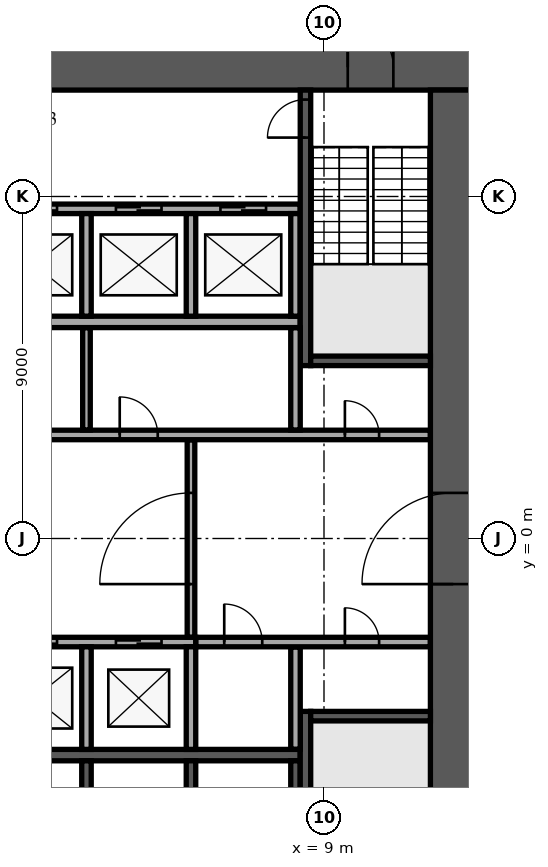
"""IFC4 building model, lengths in metres.
Left out: names, types, materials, properties, quantities, classifications, styles, units other than length and angle.
Written with IfcOpenShell. Run it as: python <this file> out.ifc"""

import sys

from ifc_helpers import new_model, si_unit, direction, frame, frame_2d, origin, place, context, subcontext, project, spatial, rectangle, extrude, element, fill, save


model = new_model("IFC4")
c1 = context("Model", 3, precision=1e-05, world=origin(), true_north=direction((0.0, 1.0)))
c2 = subcontext(c1, "Body", "Model", "MODEL_VIEW")
j1 = project(units=[si_unit("LENGTHUNIT", "METRE"), si_unit("PLANEANGLEUNIT", "RADIAN")], contexts=[c1])
p1 = place(None, origin())
s1 = spatial("IfcSite", under=j1, at=p1, CompositionType="ELEMENT")
p2 = place(p1, origin())
s2 = spatial("IfcBuilding", under=s1, at=p2, CompositionType="ELEMENT")
p3 = place(p2, origin())
s3 = spatial("IfcBuildingStorey", under=s2, at=p3, CompositionType="ELEMENT", Elevation=0.0)
p4 = place(p3, frame((-13.0, 12.4, 0.0), z_axis=(0.0, 0.0, 1.0), x_axis=(1.0, 0.0, 0.0)))
e1 = element("IfcWall", 1, at=p4, inside=s3, PredefinedType="SHEAR", context=c2, shape_type="SweptSolid", body=[
    extrude(rectangle(XDim=26.0, YDim=1.2, at=frame_2d((13.0, 0.0))), origin(), (0.0, 0.0, 1.0), 4.1),
])
p5 = place(p4, frame((11.8, 0.0, 0.0)))
e2 = element("IfcOpeningElement", 2, at=p5, cuts=e1, PredefinedType="OPENING", context=c2, shape_type="SweptSolid", body=[
    extrude(rectangle(XDim=2.4, YDim=2.4, at=frame_2d((1.2, 1.2))), frame((0.0, 0.61, 0.0), z_axis=(0.0, -1.0, 0.0), x_axis=(1.0, 0.0, 0.0)), (0.0, 0.0, 1.0), 1.22),
])
p6 = place(p4, frame((22.625, 0.0, 0.0)))
e3 = element("IfcOpeningElement", 3, at=p6, cuts=e1, PredefinedType="OPENING", context=c2, shape_type="SweptSolid", body=[
    extrude(rectangle(XDim=1.2, YDim=2.1, at=frame_2d((0.6, 1.05))), frame((0.0, 0.61, 0.0), z_axis=(0.0, -1.0, 0.0), x_axis=(1.0, 0.0, 0.0)), (0.0, 0.0, 1.0), 1.22),
])
p7 = place(p4, frame((1.6, 0.0, 0.0)))
e4 = element("IfcOpeningElement", 4, at=p7, cuts=e1, PredefinedType="OPENING", context=c2, shape_type="SweptSolid", body=[
    extrude(rectangle(XDim=1.0, YDim=2.1, at=frame_2d((0.5, 1.05))), frame((0.0, 0.61, 0.0), z_axis=(0.0, -1.0, 0.0), x_axis=(1.0, 0.0, 0.0)), (0.0, 0.0, 1.0), 1.22),
])
p8 = place(p3, frame((12.4, -11.8, 0.0), z_axis=(0.0, 0.0, 1.0), x_axis=(0.0, 1.0, 0.0)))
e5 = element("IfcWall", 5, at=p8, inside=s3, PredefinedType="SHEAR", context=c2, shape_type="SweptSolid", body=[
    extrude(rectangle(XDim=23.6, YDim=1.2, at=frame_2d((11.8, 0.0))), origin(), (0.0, 0.0, 1.0), 4.1),
])
p9 = place(p8, frame((10.6, 0.0, 0.0)))
e6 = element("IfcOpeningElement", 6, at=p9, cuts=e5, PredefinedType="OPENING", context=c2, shape_type="SweptSolid", body=[
    extrude(rectangle(XDim=2.4, YDim=2.4, at=frame_2d((1.2, 1.2))), frame((0.0, 0.61, 0.0), z_axis=(0.0, -1.0, 0.0), x_axis=(1.0, 0.0, 0.0)), (0.0, 0.0, 1.0), 1.22),
])
for number, where, z_axis, x_axis in (
    (7, (-8.375, 5.7, 0.0), (0.0, 0.0, 1.0), (1.0, 0.0, 0.0)),
    (8, (-8.375, -5.7, 0.0), (0.0, 0.0, 1.0), (1.0, 0.0, 0.0)),
):
    element("IfcWall", number, at=place(p3, frame(where, z_axis=z_axis, x_axis=x_axis)), inside=s3, PredefinedType="SOLIDWALL", context=c2, shape_type="SweptSolid", body=[
        extrude(rectangle(XDim=16.75, YDim=0.3, at=frame_2d((8.375, 0.0))), origin(), (0.0, 0.0, 1.0), 4.1),
    ])
p10 = place(p3, frame((-8.375, 8.675, 0.0), z_axis=(0.0, 0.0, 1.0), x_axis=(1.0, 0.0, 0.0)))
e9 = element("IfcWall", 9, at=p10, inside=s3, PredefinedType="SOLIDWALL", context=c2, shape_type="SweptSolid", body=[
    extrude(rectangle(XDim=16.75, YDim=0.25, at=frame_2d((8.375, 0.0))), origin(), (0.0, 0.0, 1.0), 4.1),
])
p11 = place(p10, frame((0.9, 0.0, 0.0)))
e10 = element("IfcOpeningElement", 10, at=p11, cuts=e9, PredefinedType="OPENING", context=c2, shape_type="SweptSolid", body=[
    extrude(rectangle(XDim=1.2, YDim=2.1, at=frame_2d((0.6, 1.05))), frame((0.0, 0.135, 0.0), z_axis=(0.0, -1.0, 0.0), x_axis=(1.0, 0.0, 0.0)), (0.0, 0.0, 1.0), 0.27),
])
p12 = place(p10, frame((3.65, 0.0, 0.0)))
e11 = element("IfcOpeningElement", 11, at=p12, cuts=e9, PredefinedType="OPENING", context=c2, shape_type="SweptSolid", body=[
    extrude(rectangle(XDim=1.2, YDim=2.1, at=frame_2d((0.6, 1.05))), frame((0.0, 0.135, 0.0), z_axis=(0.0, -1.0, 0.0), x_axis=(1.0, 0.0, 0.0)), (0.0, 0.0, 1.0), 0.27),
])
p13 = place(p10, frame((6.4, 0.0, 0.0)))
e12 = element("IfcOpeningElement", 12, at=p13, cuts=e9, PredefinedType="OPENING", context=c2, shape_type="SweptSolid", body=[
    extrude(rectangle(XDim=1.2, YDim=2.1, at=frame_2d((0.6, 1.05))), frame((0.0, 0.135, 0.0), z_axis=(0.0, -1.0, 0.0), x_axis=(1.0, 0.0, 0.0)), (0.0, 0.0, 1.0), 0.27),
])
p14 = place(p10, frame((9.15, 0.0, 0.0)))
e13 = element("IfcOpeningElement", 13, at=p14, cuts=e9, PredefinedType="OPENING", context=c2, shape_type="SweptSolid", body=[
    extrude(rectangle(XDim=1.2, YDim=2.1, at=frame_2d((0.6, 1.05))), frame((0.0, 0.135, 0.0), z_axis=(0.0, -1.0, 0.0), x_axis=(1.0, 0.0, 0.0)), (0.0, 0.0, 1.0), 0.27),
])
p15 = place(p10, frame((11.9, 0.0, 0.0)))
e14 = element("IfcOpeningElement", 14, at=p15, cuts=e9, PredefinedType="OPENING", context=c2, shape_type="SweptSolid", body=[
    extrude(rectangle(XDim=1.2, YDim=2.1, at=frame_2d((0.6, 1.05))), frame((0.0, 0.135, 0.0), z_axis=(0.0, -1.0, 0.0), x_axis=(1.0, 0.0, 0.0)), (0.0, 0.0, 1.0), 0.27),
])
p16 = place(p10, frame((14.65, 0.0, 0.0)))
e15 = element("IfcOpeningElement", 15, at=p16, cuts=e9, PredefinedType="OPENING", context=c2, shape_type="SweptSolid", body=[
    extrude(rectangle(XDim=1.2, YDim=2.1, at=frame_2d((0.6, 1.05))), frame((0.0, 0.135, 0.0), z_axis=(0.0, -1.0, 0.0), x_axis=(1.0, 0.0, 0.0)), (0.0, 0.0, 1.0), 0.27),
])
for number, where, z_axis, x_axis in (
    (16, (2.75, 5.85, 0.0), (0.0, 0.0, 1.0), (0.0, 1.0, 0.0)),
    (17, (5.5, 5.85, 0.0), (0.0, 0.0, 1.0), (0.0, 1.0, 0.0)),
    (18, (8.25, 5.85, 0.0), (0.0, 0.0, 1.0), (0.0, 1.0, 0.0)),
):
    element("IfcWall", number, at=place(p3, frame(where, z_axis=z_axis, x_axis=x_axis)), inside=s3, PredefinedType="SOLIDWALL", context=c2, shape_type="SweptSolid", body=[
        extrude(rectangle(XDim=2.7, YDim=0.25, at=frame_2d((1.35, 0.0))), origin(), (0.0, 0.0, 1.0), 4.1),
    ])
p17 = place(p3, frame((-8.375, -2.725, 0.0), z_axis=(0.0, 0.0, 1.0), x_axis=(1.0, 0.0, 0.0)))
e19 = element("IfcWall", 19, at=p17, inside=s3, PredefinedType="SOLIDWALL", context=c2, shape_type="SweptSolid", body=[
    extrude(rectangle(XDim=14.0, YDim=0.25, at=frame_2d((7.0, 0.0))), origin(), (0.0, 0.0, 1.0), 4.1),
])
p18 = place(p17, frame((0.9, 0.0, 0.0)))
e20 = element("IfcOpeningElement", 20, at=p18, cuts=e19, PredefinedType="OPENING", context=c2, shape_type="SweptSolid", body=[
    extrude(rectangle(XDim=1.2, YDim=2.1, at=frame_2d((0.6, 1.05))), frame((0.0, 0.135, 0.0), z_axis=(0.0, -1.0, 0.0), x_axis=(1.0, 0.0, 0.0)), (0.0, 0.0, 1.0), 0.27),
])
p19 = place(p17, frame((3.65, 0.0, 0.0)))
e21 = element("IfcOpeningElement", 21, at=p19, cuts=e19, PredefinedType="OPENING", context=c2, shape_type="SweptSolid", body=[
    extrude(rectangle(XDim=1.2, YDim=2.1, at=frame_2d((0.6, 1.05))), frame((0.0, 0.135, 0.0), z_axis=(0.0, -1.0, 0.0), x_axis=(1.0, 0.0, 0.0)), (0.0, 0.0, 1.0), 0.27),
])
p20 = place(p17, frame((6.4, 0.0, 0.0)))
e22 = element("IfcOpeningElement", 22, at=p20, cuts=e19, PredefinedType="OPENING", context=c2, shape_type="SweptSolid", body=[
    extrude(rectangle(XDim=1.2, YDim=2.1, at=frame_2d((0.6, 1.05))), frame((0.0, 0.135, 0.0), z_axis=(0.0, -1.0, 0.0), x_axis=(1.0, 0.0, 0.0)), (0.0, 0.0, 1.0), 0.27),
])
p21 = place(p17, frame((9.15, 0.0, 0.0)))
e23 = element("IfcOpeningElement", 23, at=p21, cuts=e19, PredefinedType="OPENING", context=c2, shape_type="SweptSolid", body=[
    extrude(rectangle(XDim=1.2, YDim=2.1, at=frame_2d((0.6, 1.05))), frame((0.0, 0.135, 0.0), z_axis=(0.0, -1.0, 0.0), x_axis=(1.0, 0.0, 0.0)), (0.0, 0.0, 1.0), 0.27),
])
p22 = place(p17, frame((11.9, 0.0, 0.0)))
e24 = element("IfcOpeningElement", 24, at=p22, cuts=e19, PredefinedType="OPENING", context=c2, shape_type="SweptSolid", body=[
    extrude(rectangle(XDim=1.2, YDim=2.1, at=frame_2d((0.6, 1.05))), frame((0.0, 0.135, 0.0), z_axis=(0.0, -1.0, 0.0), x_axis=(1.0, 0.0, 0.0)), (0.0, 0.0, 1.0), 0.27),
])
for number, where, z_axis, x_axis in (
    (25, (2.75, -5.55, 0.0), (0.0, 0.0, 1.0), (0.0, 1.0, 0.0)),
    (26, (5.5, -5.55, 0.0), (0.0, 0.0, 1.0), (0.0, 1.0, 0.0)),
    (27, (2.75, -8.55, 0.0), (0.0, 0.0, 1.0), (0.0, 1.0, 0.0)),
    (28, (5.5, -8.55, 0.0), (0.0, 0.0, 1.0), (0.0, 1.0, 0.0)),
    (29, (8.25, -8.55, 0.0), (0.0, 0.0, 1.0), (0.0, 1.0, 0.0)),
):
    element("IfcWall", number, at=place(p3, frame(where, z_axis=z_axis, x_axis=x_axis)), inside=s3, PredefinedType="SOLIDWALL", context=c2, shape_type="SweptSolid", body=[
        extrude(rectangle(XDim=2.7, YDim=0.25, at=frame_2d((1.35, 0.0))), origin(), (0.0, 0.0, 1.0), 4.1),
    ])
p23 = place(p3, frame((8.512, 4.55, 0.0), z_axis=(0.0, 0.0, 1.0), x_axis=(0.0, 1.0, 0.0)))
e30 = element("IfcWall", 30, at=p23, inside=s3, PredefinedType="SOLIDWALL", context=c2, shape_type="SweptSolid", body=[
    extrude(rectangle(XDim=7.25, YDim=0.275, at=frame_2d((3.625, 0.0))), origin(), (0.0, 0.0, 1.0), 4.1),
])
p24 = place(p23, frame((6.0, 0.0, 0.0)))
e31 = element("IfcOpeningElement", 31, at=p24, cuts=e30, PredefinedType="OPENING", context=c2, shape_type="SweptSolid", body=[
    extrude(rectangle(XDim=1.0, YDim=2.1, at=frame_2d((0.5, 1.05))), frame((0.0, 0.147, 0.0), z_axis=(0.0, -1.0, 0.0), x_axis=(1.0, 0.0, 0.0)), (0.0, 0.0, 1.0), 0.295),
])
p25 = place(p3, frame((8.65, 4.675, 0.0), z_axis=(0.0, 0.0, 1.0), x_axis=(1.0, 0.0, 0.0)))
e32 = element("IfcWall", 32, at=p25, inside=s3, PredefinedType="SOLIDWALL", context=c2, shape_type="SweptSolid", body=[
    extrude(rectangle(XDim=3.15, YDim=0.25, at=frame_2d((1.575, 0.0))), origin(), (0.0, 0.0, 1.0), 4.1),
])
p26 = place(p3, frame((8.512, -4.55, 0.0), z_axis=(0.0, 0.0, 1.0), x_axis=(0.0, -1.0, 0.0)))
e33 = element("IfcWall", 33, at=p26, inside=s3, PredefinedType="SOLIDWALL", context=c2, shape_type="SweptSolid", body=[
    extrude(rectangle(XDim=7.25, YDim=0.275, at=frame_2d((3.625, 0.0))), origin(), (0.0, 0.0, 1.0), 4.1),
])
p27 = place(p26, frame((6.0, 0.0, 0.0)))
e34 = element("IfcOpeningElement", 34, at=p27, cuts=e33, PredefinedType="OPENING", context=c2, shape_type="SweptSolid", body=[
    extrude(rectangle(XDim=1.0, YDim=2.1, at=frame_2d((0.5, 1.05))), frame((0.0, 0.147, 0.0), z_axis=(0.0, -1.0, 0.0), x_axis=(1.0, 0.0, 0.0)), (0.0, 0.0, 1.0), 0.295),
])
p28 = place(p3, frame((8.65, -4.675, 0.0), z_axis=(0.0, 0.0, 1.0), x_axis=(1.0, 0.0, 0.0)))
e35 = element("IfcWall", 35, at=p28, inside=s3, PredefinedType="SOLIDWALL", context=c2, shape_type="SweptSolid", body=[
    extrude(rectangle(XDim=3.15, YDim=0.25, at=frame_2d((1.575, 0.0))), origin(), (0.0, 0.0, 1.0), 4.1),
])
p29 = place(p3, frame((8.25, -5.545, 0.0), z_axis=(0.0, 0.0, 1.0), x_axis=(0.0, 1.0, 0.0)))
e36 = element("IfcWall", 36, at=p29, inside=s3, PredefinedType="PARTITIONING", context=c2, shape_type="SweptSolid", body=[
    extrude(rectangle(XDim=2.69, YDim=0.25, at=frame_2d((1.345, 0.0))), origin(), (0.0, 0.0, 1.0), 4.1),
])
p30 = place(p3, frame((5.63, -2.725, 0.0), z_axis=(0.0, 0.0, 1.0), x_axis=(1.0, 0.0, 0.0)))
e37 = element("IfcWall", 37, at=p30, inside=s3, PredefinedType="PARTITIONING", context=c2, shape_type="SweptSolid", body=[
    extrude(rectangle(XDim=6.165, YDim=0.25, at=frame_2d((3.083, 0.0))), origin(), (0.0, 0.0, 1.0), 4.1),
])
p31 = place(p30, frame((0.745, 0.0, 0.0)))
e38 = element("IfcOpeningElement", 38, at=p31, cuts=e37, PredefinedType="OPENING", context=c2, shape_type="SweptSolid", body=[
    extrude(rectangle(XDim=1.0, YDim=2.1, at=frame_2d((0.5, 1.05))), frame((0.0, 0.135, 0.0), z_axis=(0.0, -1.0, 0.0), x_axis=(1.0, 0.0, 0.0)), (0.0, 0.0, 1.0), 0.27),
])
p32 = place(p30, frame((3.92, 0.0, 0.0)))
e39 = element("IfcOpeningElement", 39, at=p32, cuts=e37, PredefinedType="OPENING", context=c2, shape_type="SweptSolid", body=[
    extrude(rectangle(XDim=0.9, YDim=2.1, at=frame_2d((0.45, 1.05))), frame((0.0, 0.135, 0.0), z_axis=(0.0, -1.0, 0.0), x_axis=(1.0, 0.0, 0.0)), (0.0, 0.0, 1.0), 0.27),
])
p33 = place(p3, frame((5.5, -2.595, 0.0), z_axis=(0.0, 0.0, 1.0), x_axis=(0.0, 1.0, 0.0)))
e40 = element("IfcWall", 40, at=p33, inside=s3, PredefinedType="PARTITIONING", context=c2, shape_type="SweptSolid", body=[
    extrude(rectangle(XDim=5.19, YDim=0.2, at=frame_2d((2.595, 0.0))), origin(), (0.0, 0.0, 1.0), 4.1),
])
p34 = place(p33, frame((1.395, 0.0, 0.0)))
e41 = element("IfcOpeningElement", 41, at=p34, cuts=e40, PredefinedType="OPENING", context=c2, shape_type="SweptSolid", body=[
    extrude(rectangle(XDim=2.4, YDim=2.4, at=frame_2d((1.2, 1.2))), frame((0.0, 0.11, 0.0), z_axis=(0.0, -1.0, 0.0), x_axis=(1.0, 0.0, 0.0)), (0.0, 0.0, 1.0), 0.22),
])
p35 = place(p3, frame((-11.795, 2.725, 0.0), z_axis=(0.0, 0.0, 1.0), x_axis=(1.0, 0.0, 0.0)))
e42 = element("IfcWall", 42, at=p35, inside=s3, PredefinedType="PARTITIONING", context=c2, shape_type="SweptSolid", body=[
    extrude(rectangle(XDim=23.59, YDim=0.25, at=frame_2d((11.795, 0.0))), origin(), (0.0, 0.0, 1.0), 4.1),
])
p36 = place(p35, frame((21.345, 0.0, 0.0)))
e43 = element("IfcOpeningElement", 43, at=p36, cuts=e42, PredefinedType="OPENING", context=c2, shape_type="SweptSolid", body=[
    extrude(rectangle(XDim=0.9, YDim=2.1, at=frame_2d((0.45, 1.05))), frame((0.0, 0.135, 0.0), z_axis=(0.0, -1.0, 0.0), x_axis=(1.0, 0.0, 0.0)), (0.0, 0.0, 1.0), 0.27),
])
p37 = place(p35, frame((1.345, 0.0, 0.0)))
e44 = element("IfcOpeningElement", 44, at=p37, cuts=e42, PredefinedType="OPENING", context=c2, shape_type="SweptSolid", body=[
    extrude(rectangle(XDim=0.9, YDim=2.1, at=frame_2d((0.45, 1.05))), frame((0.0, 0.135, 0.0), z_axis=(0.0, -1.0, 0.0), x_axis=(1.0, 0.0, 0.0)), (0.0, 0.0, 1.0), 0.27),
])
p38 = place(p35, frame((4.32, 0.0, 0.0)))
e45 = element("IfcOpeningElement", 45, at=p38, cuts=e42, PredefinedType="OPENING", context=c2, shape_type="SweptSolid", body=[
    extrude(rectangle(XDim=1.2, YDim=2.1, at=frame_2d((0.6, 1.05))), frame((0.0, 0.135, 0.0), z_axis=(0.0, -1.0, 0.0), x_axis=(1.0, 0.0, 0.0)), (0.0, 0.0, 1.0), 0.27),
])
p39 = place(p35, frame((15.42, 0.0, 0.0)))
e46 = element("IfcOpeningElement", 46, at=p39, cuts=e42, PredefinedType="OPENING", context=c2, shape_type="SweptSolid", body=[
    extrude(rectangle(XDim=1.0, YDim=2.1, at=frame_2d((0.5, 1.05))), frame((0.0, 0.135, 0.0), z_axis=(0.0, -1.0, 0.0), x_axis=(1.0, 0.0, 0.0)), (0.0, 0.0, 1.0), 0.27),
])
p40 = place(p3, frame((2.75, 2.855, 0.0), z_axis=(0.0, 0.0, 1.0), x_axis=(0.0, 1.0, 0.0)))
e47 = element("IfcWall", 47, at=p40, inside=s3, PredefinedType="PARTITIONING", context=c2, shape_type="SweptSolid", body=[
    extrude(rectangle(XDim=2.69, YDim=0.2, at=frame_2d((1.345, 0.0))), origin(), (0.0, 0.0, 1.0), 4.1),
])
p41 = place(p3, frame((8.25, 2.855, 0.0), z_axis=(0.0, 0.0, 1.0), x_axis=(0.0, 1.0, 0.0)))
e48 = element("IfcWall", 48, at=p41, inside=s3, PredefinedType="PARTITIONING", context=c2, shape_type="SweptSolid", body=[
    extrude(rectangle(XDim=2.69, YDim=0.25, at=frame_2d((1.345, 0.0))), origin(), (0.0, 0.0, 1.0), 4.1),
])
p42 = place(p6, origin())
e49 = element("IfcDoor", 49, at=p42, inside=s3, OperationType="SINGLE_SWING_LEFT", PredefinedType="DOOR", context=c2, shape_type="SweptSolid", body=[
    extrude(rectangle(XDim=1.2, YDim=2.1, at=frame_2d((0.6, 1.05))), frame((0.0, 0.025, 0.0), z_axis=(0.0, -1.0, 0.0), x_axis=(1.0, 0.0, 0.0)), (0.0, 0.0, 1.0), 0.05),
])
fill(e3, e49)
p43 = place(p9, origin())
e50 = element("IfcDoor", 50, at=p43, inside=s3, OperationType="SINGLE_SWING_LEFT", PredefinedType="DOOR", context=c2, shape_type="SweptSolid", body=[
    extrude(rectangle(XDim=2.4, YDim=2.4, at=frame_2d((1.2, 1.2))), frame((0.0, 0.025, 0.0), z_axis=(0.0, -1.0, 0.0), x_axis=(1.0, 0.0, 0.0)), (0.0, 0.0, 1.0), 0.05),
])
fill(e6, e50)
p44 = place(p14, origin())
e51 = element("IfcDoor", 51, at=p44, inside=s3, OperationType="DOUBLE_DOOR_SLIDING", PredefinedType="DOOR", context=c2, shape_type="SweptSolid", body=[
    extrude(rectangle(XDim=1.2, YDim=2.1, at=frame_2d((0.6, 1.05))), frame((0.0, 0.025, 0.0), z_axis=(0.0, -1.0, 0.0), x_axis=(1.0, 0.0, 0.0)), (0.0, 0.0, 1.0), 0.05),
])
fill(e13, e51)
p45 = place(p15, origin())
e52 = element("IfcDoor", 52, at=p45, inside=s3, OperationType="DOUBLE_DOOR_SLIDING", PredefinedType="DOOR", context=c2, shape_type="SweptSolid", body=[
    extrude(rectangle(XDim=1.2, YDim=2.1, at=frame_2d((0.6, 1.05))), frame((0.0, 0.025, 0.0), z_axis=(0.0, -1.0, 0.0), x_axis=(1.0, 0.0, 0.0)), (0.0, 0.0, 1.0), 0.05),
])
fill(e14, e52)
p46 = place(p16, origin())
e53 = element("IfcDoor", 53, at=p46, inside=s3, OperationType="DOUBLE_DOOR_SLIDING", PredefinedType="DOOR", context=c2, shape_type="SweptSolid", body=[
    extrude(rectangle(XDim=1.2, YDim=2.1, at=frame_2d((0.6, 1.05))), frame((0.0, 0.025, 0.0), z_axis=(0.0, -1.0, 0.0), x_axis=(1.0, 0.0, 0.0)), (0.0, 0.0, 1.0), 0.05),
])
fill(e15, e53)
p47 = place(p21, origin())
e54 = element("IfcDoor", 54, at=p47, inside=s3, OperationType="DOUBLE_DOOR_SLIDING", PredefinedType="DOOR", context=c2, shape_type="SweptSolid", body=[
    extrude(rectangle(XDim=1.2, YDim=2.1, at=frame_2d((0.6, 1.05))), frame((0.0, 0.025, 0.0), z_axis=(0.0, -1.0, 0.0), x_axis=(1.0, 0.0, 0.0)), (0.0, 0.0, 1.0), 0.05),
])
fill(e23, e54)
p48 = place(p22, origin())
e55 = element("IfcDoor", 55, at=p48, inside=s3, OperationType="DOUBLE_DOOR_SLIDING", PredefinedType="DOOR", context=c2, shape_type="SweptSolid", body=[
    extrude(rectangle(XDim=1.2, YDim=2.1, at=frame_2d((0.6, 1.05))), frame((0.0, 0.025, 0.0), z_axis=(0.0, -1.0, 0.0), x_axis=(1.0, 0.0, 0.0)), (0.0, 0.0, 1.0), 0.05),
])
fill(e24, e55)
p49 = place(p24, origin())
e56 = element("IfcDoor", 56, at=p49, inside=s3, OperationType="SINGLE_SWING_LEFT", PredefinedType="DOOR", context=c2, shape_type="SweptSolid", body=[
    extrude(rectangle(XDim=1.0, YDim=2.1, at=frame_2d((0.5, 1.05))), frame((0.0, 0.025, 0.0), z_axis=(0.0, -1.0, 0.0), x_axis=(1.0, 0.0, 0.0)), (0.0, 0.0, 1.0), 0.05),
])
fill(e31, e56)
p50 = place(p31, origin())
e57 = element("IfcDoor", 57, at=p50, inside=s3, OperationType="SINGLE_SWING_LEFT", PredefinedType="DOOR", context=c2, shape_type="SweptSolid", body=[
    extrude(rectangle(XDim=1.0, YDim=2.1, at=frame_2d((0.5, 1.05))), frame((0.0, 0.025, 0.0), z_axis=(0.0, -1.0, 0.0), x_axis=(1.0, 0.0, 0.0)), (0.0, 0.0, 1.0), 0.05),
])
fill(e38, e57)
p51 = place(p36, origin())
e58 = element("IfcDoor", 58, at=p51, inside=s3, OperationType="SINGLE_SWING_LEFT", PredefinedType="DOOR", context=c2, shape_type="SweptSolid", body=[
    extrude(rectangle(XDim=0.9, YDim=2.1, at=frame_2d((0.45, 1.05))), frame((0.0, 0.025, 0.0), z_axis=(0.0, -1.0, 0.0), x_axis=(1.0, 0.0, 0.0)), (0.0, 0.0, 1.0), 0.05),
])
fill(e43, e58)
p52 = place(p32, origin())
e59 = element("IfcDoor", 59, at=p52, inside=s3, OperationType="SINGLE_SWING_LEFT", PredefinedType="DOOR", context=c2, shape_type="SweptSolid", body=[
    extrude(rectangle(XDim=0.9, YDim=2.1, at=frame_2d((0.45, 1.05))), frame((0.0, 0.025, 0.0), z_axis=(0.0, -1.0, 0.0), x_axis=(1.0, 0.0, 0.0)), (0.0, 0.0, 1.0), 0.05),
])
fill(e39, e59)
p53 = place(p39, origin())
e60 = element("IfcDoor", 60, at=p53, inside=s3, OperationType="SINGLE_SWING_LEFT", PredefinedType="DOOR", context=c2, shape_type="SweptSolid", body=[
    extrude(rectangle(XDim=1.0, YDim=2.1, at=frame_2d((0.5, 1.05))), frame((0.0, 0.025, 0.0), z_axis=(0.0, -1.0, 0.0), x_axis=(1.0, 0.0, 0.0)), (0.0, 0.0, 1.0), 0.05),
])
fill(e46, e60)
p54 = place(p34, origin())
e61 = element("IfcDoor", 61, at=p54, inside=s3, OperationType="SINGLE_SWING_LEFT", PredefinedType="DOOR", context=c2, shape_type="SweptSolid", body=[
    extrude(rectangle(XDim=2.4, YDim=2.4, at=frame_2d((1.2, 1.2))), frame((0.0, 0.025, 0.0), z_axis=(0.0, -1.0, 0.0), x_axis=(1.0, 0.0, 0.0)), (0.0, 0.0, 1.0), 0.05),
])
fill(e41, e61)
save(model, sys.argv[1])
